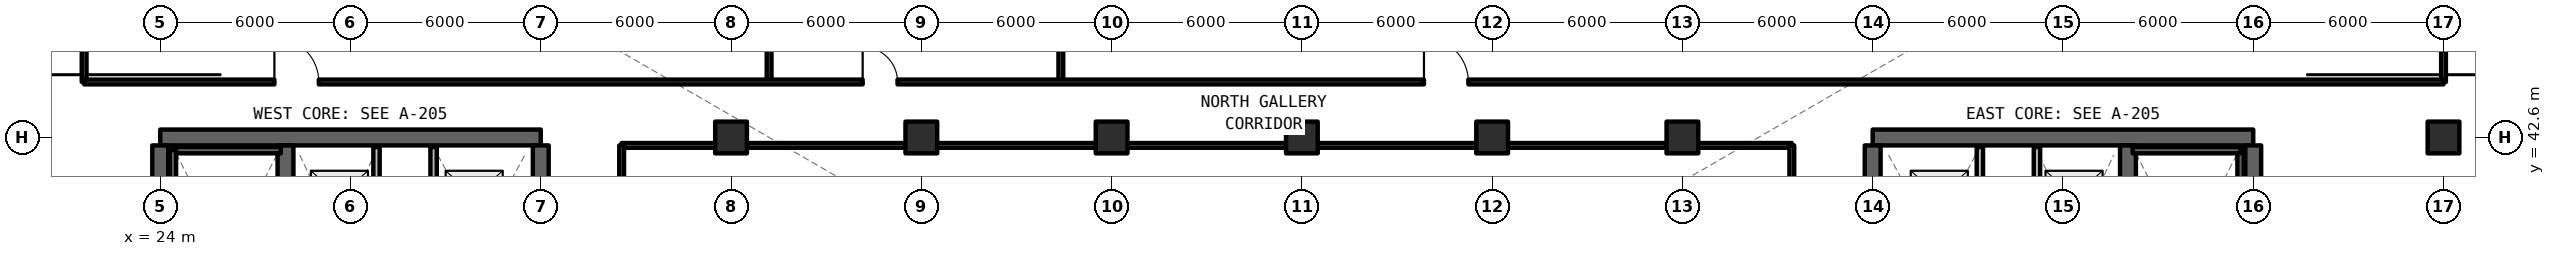
"""IFC4 building model, lengths in metres.
Left out: names, types, materials, properties, quantities, classifications, styles, units other than length and angle.
Written with IfcOpenShell. Run it as: python <this file> out.ifc"""

import sys

from ifc_helpers import new_model, si_unit, direction, frame, frame_2d, origin, origin_2d, place, context, subcontext, project, spatial, rectangle, extrude, element, fill, save


model = new_model("IFC4")
c1 = context("Model", 3, precision=1e-05, world=origin(), true_north=direction((0.0, 1.0)))
c2 = subcontext(c1, "Body", "Model", "MODEL_VIEW")
j1 = project(units=[si_unit("LENGTHUNIT", "METRE"), si_unit("PLANEANGLEUNIT", "RADIAN")], contexts=[c1])
p1 = place(None, origin())
s1 = spatial("IfcSite", under=j1, at=p1, CompositionType="ELEMENT")
p2 = place(p1, origin())
s2 = spatial("IfcBuilding", under=s1, at=p2, CompositionType="ELEMENT")
p3 = place(p2, frame((0.0, 0.0, 78.21)))
s3 = spatial("IfcBuildingStorey", under=s2, at=p3, CompositionType="ELEMENT", Elevation=78.21)
p4 = place(p3, frame((36.0, 42.6, 0.0), z_axis=(0.0, 0.0, 1.0), x_axis=(-1.0, 0.0, 0.0)))
e1 = element("IfcWall", 1, at=p4, inside=s3, PredefinedType="SHEAR", context=c2, shape_type="SweptSolid", body=[
    extrude(rectangle(XDim=12.0, YDim=0.5, at=frame_2d((6.0, 0.0))), origin(), (0.0, 0.0, 1.0), 3.96),
])
p5 = place(p3, frame((24.0, 24.85, 0.0), z_axis=(0.0, 0.0, 1.0), x_axis=(0.0, 1.0, 0.0)))
e2 = element("IfcWall", 2, at=p5, inside=s3, PredefinedType="SHEAR", context=c2, shape_type="SweptSolid", body=[
    extrude(rectangle(XDim=17.5, YDim=0.5, at=frame_2d((8.75, 0.0))), origin(), (0.0, 0.0, 1.0), 3.96),
])
p6 = place(p3, frame((36.0, 36.8, 0.0), z_axis=(0.0, 0.0, 1.0), x_axis=(0.0, 1.0, 0.0)))
e3 = element("IfcWall", 3, at=p6, inside=s3, PredefinedType="SHEAR", context=c2, shape_type="SweptSolid", body=[
    extrude(rectangle(XDim=5.55, YDim=0.5, at=frame_2d((2.775, 0.0))), origin(), (0.0, 0.0, 1.0), 3.96),
])
p7 = place(p3, frame((27.95, 24.85, 0.0), z_axis=(0.0, 0.0, 1.0), x_axis=(0.0, 1.0, 0.0)))
e4 = element("IfcWall", 4, at=p7, inside=s3, PredefinedType="SHEAR", context=c2, shape_type="SweptSolid", body=[
    extrude(rectangle(XDim=17.5, YDim=0.5, at=frame_2d((8.75, 0.0))), origin(), (0.0, 0.0, 1.0), 3.96),
])
p8 = place(p7, frame((0.4, 0.0, 0.0)))
e5 = element("IfcOpeningElement", 5, at=p8, cuts=e4, PredefinedType="OPENING", context=c2, shape_type="SweptSolid", body=[
    extrude(rectangle(XDim=1.15, YDim=2.15, at=frame_2d((0.575, 1.075))), frame((0.0, 0.26, 0.0), z_axis=(0.0, -1.0, 0.0), x_axis=(1.0, 0.0, 0.0)), (0.0, 0.0, 1.0), 0.52),
])
p9 = place(p7, frame((9.6, 0.0, 0.0)))
e6 = element("IfcOpeningElement", 6, at=p9, cuts=e4, PredefinedType="OPENING", context=c2, shape_type="SweptSolid", body=[
    extrude(rectangle(XDim=1.15, YDim=2.15, at=frame_2d((0.575, 1.075))), frame((0.0, 0.26, 0.0), z_axis=(0.0, -1.0, 0.0), x_axis=(1.0, 0.0, 0.0)), (0.0, 0.0, 1.0), 0.52),
])
p10 = place(p3, frame((90.0, 42.6, 0.0), z_axis=(0.0, 0.0, 1.0), x_axis=(-1.0, 0.0, 0.0)))
e7 = element("IfcWall", 7, at=p10, inside=s3, PredefinedType="SHEAR", context=c2, shape_type="SweptSolid", body=[
    extrude(rectangle(XDim=12.0, YDim=0.5, at=frame_2d((6.0, 0.0))), origin(), (0.0, 0.0, 1.0), 3.96),
])
p11 = place(p3, frame((90.0, 24.85, 0.0), z_axis=(0.0, 0.0, 1.0), x_axis=(0.0, 1.0, 0.0)))
e8 = element("IfcWall", 8, at=p11, inside=s3, PredefinedType="SHEAR", context=c2, shape_type="SweptSolid", body=[
    extrude(rectangle(XDim=17.5, YDim=0.5, at=frame_2d((8.75, 0.0))), origin(), (0.0, 0.0, 1.0), 3.96),
])
p12 = place(p3, frame((78.0, 36.8, 0.0), z_axis=(0.0, 0.0, 1.0), x_axis=(0.0, 1.0, 0.0)))
e9 = element("IfcWall", 9, at=p12, inside=s3, PredefinedType="SHEAR", context=c2, shape_type="SweptSolid", body=[
    extrude(rectangle(XDim=5.55, YDim=0.5, at=frame_2d((2.775, 0.0))), origin(), (0.0, 0.0, 1.0), 3.96),
])
p13 = place(p3, frame((86.05, 24.85, 0.0), z_axis=(0.0, 0.0, 1.0), x_axis=(0.0, 1.0, 0.0)))
e10 = element("IfcWall", 10, at=p13, inside=s3, PredefinedType="SHEAR", context=c2, shape_type="SweptSolid", body=[
    extrude(rectangle(XDim=17.5, YDim=0.5, at=frame_2d((8.75, 0.0))), origin(), (0.0, 0.0, 1.0), 3.96),
])
p14 = place(p13, frame((0.4, 0.0, 0.0)))
e11 = element("IfcOpeningElement", 11, at=p14, cuts=e10, PredefinedType="OPENING", context=c2, shape_type="SweptSolid", body=[
    extrude(rectangle(XDim=1.15, YDim=2.15, at=frame_2d((0.575, 1.075))), frame((0.0, 0.26, 0.0), z_axis=(0.0, -1.0, 0.0), x_axis=(1.0, 0.0, 0.0)), (0.0, 0.0, 1.0), 0.52),
])
p15 = place(p13, frame((9.6, 0.0, 0.0)))
e12 = element("IfcOpeningElement", 12, at=p15, cuts=e10, PredefinedType="OPENING", context=c2, shape_type="SweptSolid", body=[
    extrude(rectangle(XDim=1.15, YDim=2.15, at=frame_2d((0.575, 1.075))), frame((0.0, 0.26, 0.0), z_axis=(0.0, -1.0, 0.0), x_axis=(1.0, 0.0, 0.0)), (0.0, 0.0, 1.0), 0.52),
])
for number, where, z_axis, x_axis in (
    (13, (42.0, 42.6, 0.0), (0.0, 0.0, 1.0), (1.0, 0.0, 0.0)),
    (14, (48.0, 42.6, 0.0), (0.0, 0.0, 1.0), (1.0, 0.0, 0.0)),
    (15, (54.0, 42.6, 0.0), (0.0, 0.0, 1.0), (1.0, 0.0, 0.0)),
    (16, (60.0, 42.6, 0.0), (0.0, 0.0, 1.0), (1.0, 0.0, 0.0)),
    (17, (66.0, 42.6, 0.0), (0.0, 0.0, 1.0), (1.0, 0.0, 0.0)),
    (18, (72.0, 42.6, 0.0), (0.0, 0.0, 1.0), (1.0, 0.0, 0.0)),
    (19, (96.0, 42.6, 0.0), (0.0, 0.0, 1.0), (1.0, 0.0, 0.0)),
):
    element("IfcColumn", number, at=place(p3, frame(where, z_axis=z_axis, x_axis=x_axis)), inside=s3, PredefinedType="COLUMN", context=c2, shape_type="SweptSolid", body=[
        extrude(rectangle(XDim=1.0, YDim=1.0, at=origin_2d()), origin(), (0.0, 0.0, 1.0), 3.96),
    ])
p16 = place(p3, frame((30.82, 36.88, 0.0), z_axis=(0.0, 0.0, 1.0), x_axis=(0.0, 1.0, 0.0)))
e20 = element("IfcWall", 20, at=p16, inside=s3, PredefinedType="SOLIDWALL", context=c2, shape_type="SweptSolid", body=[
    extrude(rectangle(XDim=5.42, YDim=0.2, at=frame_2d((2.71, 0.0))), origin(), (0.0, 0.0, 1.0), 2.96),
])
p17 = place(p16, frame((0.8, 0.0, 0.0)))
e21 = element("IfcOpeningElement", 21, at=p17, cuts=e20, PredefinedType="OPENING", context=c2, shape_type="SweptSolid", body=[
    extrude(rectangle(XDim=1.1, YDim=2.2, at=frame_2d((0.55, 1.1))), frame((0.0, 0.11, 0.0), z_axis=(0.0, -1.0, 0.0), x_axis=(1.0, 0.0, 0.0)), (0.0, 0.0, 1.0), 0.22),
])
p18 = place(p16, frame((3.3, 0.0, 0.0)))
e22 = element("IfcOpeningElement", 22, at=p18, cuts=e20, PredefinedType="OPENING", context=c2, shape_type="SweptSolid", body=[
    extrude(rectangle(XDim=1.1, YDim=2.2, at=frame_2d((0.55, 1.1))), frame((0.0, 0.11, 0.0), z_axis=(0.0, -1.0, 0.0), x_axis=(1.0, 0.0, 0.0)), (0.0, 0.0, 1.0), 0.22),
])
p19 = place(p3, frame((32.62, 36.88, 0.0), z_axis=(0.0, 0.0, 1.0), x_axis=(0.0, 1.0, 0.0)))
e23 = element("IfcWall", 23, at=p19, inside=s3, PredefinedType="SOLIDWALL", context=c2, shape_type="SweptSolid", body=[
    extrude(rectangle(XDim=5.42, YDim=0.2, at=frame_2d((2.71, 0.0))), origin(), (0.0, 0.0, 1.0), 2.96),
])
p20 = place(p19, frame((0.8, 0.0, 0.0)))
e24 = element("IfcOpeningElement", 24, at=p20, cuts=e23, PredefinedType="OPENING", context=c2, shape_type="SweptSolid", body=[
    extrude(rectangle(XDim=1.1, YDim=2.2, at=frame_2d((0.55, 1.1))), frame((0.0, 0.11, 0.0), z_axis=(0.0, -1.0, 0.0), x_axis=(1.0, 0.0, 0.0)), (0.0, 0.0, 1.0), 0.22),
])
p21 = place(p19, frame((3.3, 0.0, 0.0)))
e25 = element("IfcOpeningElement", 25, at=p21, cuts=e23, PredefinedType="OPENING", context=c2, shape_type="SweptSolid", body=[
    extrude(rectangle(XDim=1.1, YDim=2.2, at=frame_2d((0.55, 1.1))), frame((0.0, 0.11, 0.0), z_axis=(0.0, -1.0, 0.0), x_axis=(1.0, 0.0, 0.0)), (0.0, 0.0, 1.0), 0.22),
])
p22 = place(p3, frame((83.18, 36.88, 0.0), z_axis=(0.0, 0.0, 1.0), x_axis=(0.0, 1.0, 0.0)))
e26 = element("IfcWall", 26, at=p22, inside=s3, PredefinedType="SOLIDWALL", context=c2, shape_type="SweptSolid", body=[
    extrude(rectangle(XDim=5.42, YDim=0.2, at=frame_2d((2.71, 0.0))), origin(), (0.0, 0.0, 1.0), 2.96),
])
p23 = place(p22, frame((0.8, 0.0, 0.0)))
e27 = element("IfcOpeningElement", 27, at=p23, cuts=e26, PredefinedType="OPENING", context=c2, shape_type="SweptSolid", body=[
    extrude(rectangle(XDim=1.1, YDim=2.2, at=frame_2d((0.55, 1.1))), frame((0.0, 0.11, 0.0), z_axis=(0.0, -1.0, 0.0), x_axis=(1.0, 0.0, 0.0)), (0.0, 0.0, 1.0), 0.22),
])
p24 = place(p22, frame((3.3, 0.0, 0.0)))
e28 = element("IfcOpeningElement", 28, at=p24, cuts=e26, PredefinedType="OPENING", context=c2, shape_type="SweptSolid", body=[
    extrude(rectangle(XDim=1.1, YDim=2.2, at=frame_2d((0.55, 1.1))), frame((0.0, 0.11, 0.0), z_axis=(0.0, -1.0, 0.0), x_axis=(1.0, 0.0, 0.0)), (0.0, 0.0, 1.0), 0.22),
])
p25 = place(p3, frame((81.38, 36.88, 0.0), z_axis=(0.0, 0.0, 1.0), x_axis=(0.0, 1.0, 0.0)))
e29 = element("IfcWall", 29, at=p25, inside=s3, PredefinedType="SOLIDWALL", context=c2, shape_type="SweptSolid", body=[
    extrude(rectangle(XDim=5.42, YDim=0.2, at=frame_2d((2.71, 0.0))), origin(), (0.0, 0.0, 1.0), 2.96),
])
p26 = place(p25, frame((0.8, 0.0, 0.0)))
e30 = element("IfcOpeningElement", 30, at=p26, cuts=e29, PredefinedType="OPENING", context=c2, shape_type="SweptSolid", body=[
    extrude(rectangle(XDim=1.1, YDim=2.2, at=frame_2d((0.55, 1.1))), frame((0.0, 0.11, 0.0), z_axis=(0.0, -1.0, 0.0), x_axis=(1.0, 0.0, 0.0)), (0.0, 0.0, 1.0), 0.22),
])
p27 = place(p25, frame((3.3, 0.0, 0.0)))
e31 = element("IfcOpeningElement", 31, at=p27, cuts=e29, PredefinedType="OPENING", context=c2, shape_type="SweptSolid", body=[
    extrude(rectangle(XDim=1.1, YDim=2.2, at=frame_2d((0.55, 1.1))), frame((0.0, 0.11, 0.0), z_axis=(0.0, -1.0, 0.0), x_axis=(1.0, 0.0, 0.0)), (0.0, 0.0, 1.0), 0.22),
])
p28 = place(p3, frame((38.55, 42.35, 0.0), z_axis=(0.0, 0.0, 1.0), x_axis=(1.0, 0.0, 0.0)))
e32 = element("IfcWall", 32, at=p28, inside=s3, PredefinedType="SOLIDWALL", context=c2, shape_type="SweptSolid", body=[
    extrude(rectangle(XDim=36.9, YDim=0.15, at=frame_2d((18.45, 0.0))), origin(), (0.0, 0.0, 1.0), 2.96),
])
p29 = place(p3, frame((38.55, 24.85, 0.0), z_axis=(0.0, 0.0, 1.0), x_axis=(0.0, 1.0, 0.0)))
e33 = element("IfcWall", 33, at=p29, inside=s3, PredefinedType="SOLIDWALL", context=c2, shape_type="SweptSolid", body=[
    extrude(rectangle(XDim=17.5, YDim=0.15, at=frame_2d((8.75, 0.0))), origin(), (0.0, 0.0, 1.0), 2.96),
])
p30 = place(p29, frame((7.8, 0.0, 0.0)))
e34 = element("IfcOpeningElement", 34, at=p30, cuts=e33, PredefinedType="OPENING", context=c2, shape_type="SweptSolid", body=[
    extrude(rectangle(XDim=1.4, YDim=2.15, at=frame_2d((0.7, 1.075))), frame((0.0, 0.085, 0.0), z_axis=(0.0, -1.0, 0.0), x_axis=(1.0, 0.0, 0.0)), (0.0, 0.0, 1.0), 0.17),
])
p31 = place(p3, frame((75.45, 24.85, 0.0), z_axis=(0.0, 0.0, 1.0), x_axis=(0.0, 1.0, 0.0)))
e35 = element("IfcWall", 35, at=p31, inside=s3, PredefinedType="SOLIDWALL", context=c2, shape_type="SweptSolid", body=[
    extrude(rectangle(XDim=17.5, YDim=0.15, at=frame_2d((8.75, 0.0))), origin(), (0.0, 0.0, 1.0), 2.96),
])
p32 = place(p3, frame((21.6, 44.35, 0.0), z_axis=(0.0, 0.0, 1.0), x_axis=(0.0, 1.0, 0.0)))
e36 = element("IfcWall", 36, at=p32, inside=s3, PredefinedType="SOLIDWALL", context=c2, shape_type="SweptSolid", body=[
    extrude(rectangle(XDim=13.15, YDim=0.15, at=frame_2d((6.575, 0.0))), origin(), (0.0, 0.0, 1.0), 2.96),
])
for number, where, z_axis, x_axis in (
    (37, (43.2, 44.35, 0.0), (0.0, 0.0, 1.0), (0.0, 1.0, 0.0)),
    (38, (52.4, 44.35, 0.0), (0.0, 0.0, 1.0), (0.0, 1.0, 0.0)),
):
    element("IfcWall", number, at=place(p3, frame(where, z_axis=z_axis, x_axis=x_axis)), inside=s3, PredefinedType="PARTITIONING", context=c2, shape_type="SweptSolid", body=[
        extrude(rectangle(XDim=13.15, YDim=0.15, at=frame_2d((6.575, 0.0))), origin(), (0.0, 0.0, 1.0), 2.96),
    ])
p33 = place(p3, frame((96.0, 44.35, 0.0), z_axis=(0.0, 0.0, 1.0), x_axis=(0.0, 1.0, 0.0)))
e39 = element("IfcWall", 39, at=p33, inside=s3, PredefinedType="SOLIDWALL", context=c2, shape_type="SweptSolid", body=[
    extrude(rectangle(XDim=13.15, YDim=0.15, at=frame_2d((6.575, 0.0))), origin(), (0.0, 0.0, 1.0), 2.96),
])
p34 = place(p3, frame((21.6, 44.35, 0.0), z_axis=(0.0, 0.0, 1.0), x_axis=(1.0, 0.0, 0.0)))
e40 = element("IfcWall", 40, at=p34, inside=s3, PredefinedType="SOLIDWALL", context=c2, shape_type="SweptSolid", body=[
    extrude(rectangle(XDim=74.4, YDim=0.15, at=frame_2d((37.2, 0.0))), origin(), (0.0, 0.0, 1.0), 2.96),
])
p35 = place(p34, frame((6.0, 0.0, 0.0)))
e41 = element("IfcOpeningElement", 41, at=p35, cuts=e40, PredefinedType="OPENING", context=c2, shape_type="SweptSolid", body=[
    extrude(rectangle(XDim=1.4, YDim=2.15, at=frame_2d((0.7, 1.075))), frame((0.0, 0.085, 0.0), z_axis=(0.0, -1.0, 0.0), x_axis=(1.0, 0.0, 0.0)), (0.0, 0.0, 1.0), 0.17),
])
p36 = place(p34, frame((24.55, 0.0, 0.0)))
e42 = element("IfcOpeningElement", 42, at=p36, cuts=e40, PredefinedType="OPENING", context=c2, shape_type="SweptSolid", body=[
    extrude(rectangle(XDim=1.1, YDim=2.15, at=frame_2d((0.55, 1.075))), frame((0.0, 0.085, 0.0), z_axis=(0.0, -1.0, 0.0), x_axis=(1.0, 0.0, 0.0)), (0.0, 0.0, 1.0), 0.17),
])
p37 = place(p34, frame((42.25, 0.0, 0.0)))
e43 = element("IfcOpeningElement", 43, at=p37, cuts=e40, PredefinedType="OPENING", context=c2, shape_type="SweptSolid", body=[
    extrude(rectangle(XDim=1.4, YDim=2.15, at=frame_2d((0.7, 1.075))), frame((0.0, 0.085, 0.0), z_axis=(0.0, -1.0, 0.0), x_axis=(1.0, 0.0, 0.0)), (0.0, 0.0, 1.0), 0.17),
])
p38 = place(p3, frame((27.8, 42.2, 0.0), z_axis=(0.0, 0.0, 1.0), x_axis=(-1.0, 0.0, 0.0)))
e44 = element("IfcWall", 44, at=p38, inside=s3, PredefinedType="SOLIDWALL", context=c2, shape_type="SweptSolid", body=[
    extrude(rectangle(XDim=3.4, YDim=0.2, at=frame_2d((1.7, 0.0))), origin(), (0.0, 0.0, 1.0), 3.96),
])
for number, where, z_axis, x_axis in (
    (45, (24.4, 42.2, 0.0), (0.0, 0.0, 1.0), (0.0, -1.0, 0.0)),
    (46, (89.6, 34.2, 0.0), (0.0, 0.0, 1.0), (0.0, 1.0, 0.0)),
):
    element("IfcWall", number, at=place(p3, frame(where, z_axis=z_axis, x_axis=x_axis)), inside=s3, PredefinedType="SOLIDWALL", context=c2, shape_type="SweptSolid", body=[
        extrude(rectangle(XDim=8.0, YDim=0.2, at=frame_2d((4.0, 0.0))), origin(), (0.0, 0.0, 1.0), 3.96),
    ])
p39 = place(p3, frame((89.6, 42.2, 0.0), z_axis=(0.0, 0.0, 1.0), x_axis=(-1.0, 0.0, 0.0)))
e47 = element("IfcWall", 47, at=p39, inside=s3, PredefinedType="SOLIDWALL", context=c2, shape_type="SweptSolid", body=[
    extrude(rectangle(XDim=3.4, YDim=0.2, at=frame_2d((1.7, 0.0))), origin(), (0.0, 0.0, 1.0), 3.96),
])
p40 = place(p35, origin())
e48 = element("IfcDoor", 48, at=p40, inside=s3, OperationType="SINGLE_SWING_RIGHT", PredefinedType="DOOR", context=c2, shape_type="SweptSolid", body=[
    extrude(rectangle(XDim=1.4, YDim=2.15, at=frame_2d((0.7, 1.075))), frame((0.0, 0.025, 0.0), z_axis=(0.0, -1.0, 0.0), x_axis=(1.0, 0.0, 0.0)), (0.0, 0.0, 1.0), 0.05),
])
fill(e41, e48)
p41 = place(p36, origin())
e49 = element("IfcDoor", 49, at=p41, inside=s3, OperationType="SINGLE_SWING_LEFT", PredefinedType="DOOR", context=c2, shape_type="SweptSolid", body=[
    extrude(rectangle(XDim=1.1, YDim=2.15, at=frame_2d((0.55, 1.075))), frame((0.0, 0.025, 0.0), z_axis=(0.0, -1.0, 0.0), x_axis=(1.0, 0.0, 0.0)), (0.0, 0.0, 1.0), 0.05),
])
fill(e42, e49)
p42 = place(p37, origin())
e50 = element("IfcDoor", 50, at=p42, inside=s3, OperationType="SINGLE_SWING_RIGHT", PredefinedType="DOOR", context=c2, shape_type="SweptSolid", body=[
    extrude(rectangle(XDim=1.4, YDim=2.15, at=frame_2d((0.7, 1.075))), frame((0.0, 0.025, 0.0), z_axis=(0.0, -1.0, 0.0), x_axis=(1.0, 0.0, 0.0)), (0.0, 0.0, 1.0), 0.05),
])
fill(e43, e50)
save(model, sys.argv[1])
